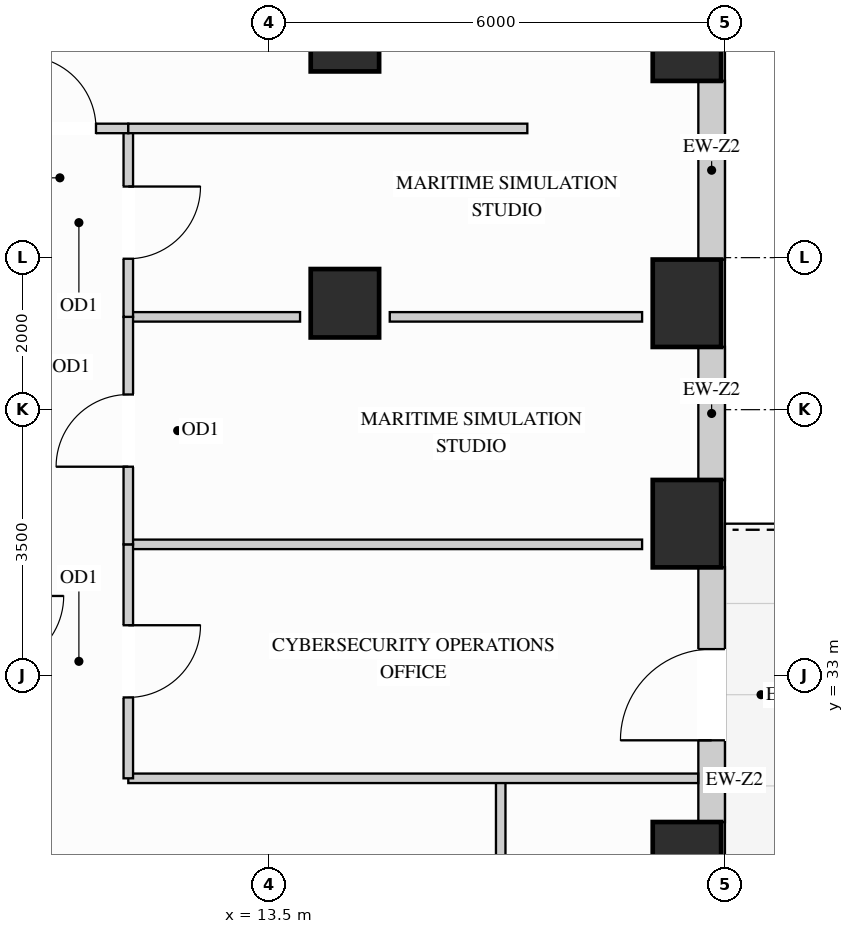
"""IFC4 building model, lengths in metres.
Left out: names, types, materials, properties, quantities, classifications, styles, units other than length and angle.
Written with IfcOpenShell. Run it as: python <this file> out.ifc"""

import sys

from ifc_helpers import new_model, si_unit, direction, frame, frame_2d, origin, origin_2d, place, context, subcontext, project, spatial, rectangle, extrude, source, transform, mapped, element, fill, save


model = new_model("IFC4")
c1 = context("Model", 3, precision=1e-05, world=origin(), true_north=direction((0.0, 1.0)))
c2 = subcontext(c1, "Body", "Model", "MODEL_VIEW")
j1 = project(units=[si_unit("LENGTHUNIT", "METRE"), si_unit("PLANEANGLEUNIT", "RADIAN")], contexts=[c1])
p1 = place(None, origin())
s1 = spatial("IfcSite", under=j1, at=p1, CompositionType="ELEMENT")
p2 = place(p1, origin())
s2 = spatial("IfcBuilding", under=s1, at=p2, CompositionType="ELEMENT")
p3 = place(p2, frame((0.0, 0.0, 127.8)))
s3 = spatial("IfcBuildingStorey", under=s2, at=p3, CompositionType="ELEMENT", Elevation=127.8)
m1 = source(origin(), c2, "Body", "SweptSolid", [
    extrude(rectangle(XDim=0.9, YDim=0.9, at=origin_2d()), origin(), (0.0, 0.0, 1.0), 3.38),
])
for number, where, z_axis, x_axis in (
    (1, (14.5, 37.9, 0.0), (0.0, 0.0, 1.0), (1.0, 0.0, 0.0)),
    (2, (14.5, 41.4, 0.0), (0.0, 0.0, 1.0), (1.0, 0.0, 0.0)),
):
    element("IfcColumn", number, at=place(p3, frame(where, z_axis=z_axis, x_axis=x_axis)), inside=s3, PredefinedType="COLUMN", context=c2, shape_type="MappedRepresentation", body=[
        mapped(m1, transform((0.0, 0.0, 0.0), x_axis=(1.0, 0.0, 0.0), y_axis=(0.0, 1.0, 0.0), z_axis=(0.0, 0.0, 1.0))),
    ])
m2 = source(origin(), c2, "Body", "SweptSolid", [
    extrude(rectangle(XDim=0.9, YDim=1.15, at=origin_2d()), origin(), (0.0, 0.0, 1.0), 3.38),
])
for number, where, z_axis, x_axis in (
    (3, (19.0, 30.5, 0.0), (0.0, 0.0, 1.0), (1.0, 0.0, 0.0)),
    (4, (19.0, 35.0, 0.0), (0.0, 0.0, 1.0), (1.0, 0.0, 0.0)),
    (5, (19.0, 37.9, 0.0), (0.0, 0.0, 1.0), (1.0, 0.0, 0.0)),
    (6, (19.0, 41.4, 0.0), (0.0, 0.0, 1.0), (1.0, 0.0, 0.0)),
):
    element("IfcColumn", number, at=place(p3, frame(where, z_axis=z_axis, x_axis=x_axis)), inside=s3, PredefinedType="COLUMN", context=c2, shape_type="MappedRepresentation", body=[
        mapped(m2, transform((0.0, 0.0, 0.0), x_axis=(1.0, 0.0, 0.0), y_axis=(0.0, 1.0, 0.0), z_axis=(0.0, 0.0, 1.0))),
    ])
p4 = place(p3, frame((19.325, 31.073, 0.0), z_axis=(0.0, 0.0, 1.0), x_axis=(0.0, 1.0, 0.0)))
e7 = element("IfcWall", 7, at=p4, inside=s3, PredefinedType="SOLIDWALL", context=c2, shape_type="SweptSolid", body=[
    extrude(rectangle(XDim=3.354, YDim=0.35, at=frame_2d((1.677, 0.0))), origin(), (0.0, 0.0, 1.0), 2.519),
])
p5 = place(p4, frame((1.077, 0.0, 0.0)))
e8 = element("IfcOpeningElement", 8, at=p5, cuts=e7, PredefinedType="OPENING", context=c2, shape_type="SweptSolid", body=[
    extrude(rectangle(XDim=1.2, YDim=2.15, at=frame_2d((0.6, 1.075))), frame((0.0, 0.185, 0.0), z_axis=(0.0, -1.0, 0.0), x_axis=(1.0, 0.0, 0.0)), (0.0, 0.0, 1.0), 0.37),
])
m3 = source(origin(), c2, "Body", "SweptSolid", [
    extrude(rectangle(XDim=1.754, YDim=0.35, at=frame_2d((0.877, 0.0))), origin(), (0.0, 0.0, 1.0), 2.519),
])
p6 = place(p3, frame((19.325, 35.573, 0.0), z_axis=(0.0, 0.0, 1.0), x_axis=(0.0, 1.0, 0.0)))
e9 = element("IfcWall", 9, at=p6, inside=s3, PredefinedType="SOLIDWALL", context=c2, shape_type="MappedRepresentation", body=[
    mapped(m3, transform((0.0, 0.0, 0.0), x_axis=(1.0, 0.0, 0.0), y_axis=(0.0, 1.0, 0.0), z_axis=(0.0, 0.0, 1.0))),
])
m4 = source(origin(), c2, "Body", "SweptSolid", [
    extrude(rectangle(XDim=2.354, YDim=0.35, at=frame_2d((1.177, 0.0))), origin(), (0.0, 0.0, 1.0), 2.519),
])
p7 = place(p3, frame((19.325, 38.473, 0.0), z_axis=(0.0, 0.0, 1.0), x_axis=(0.0, 1.0, 0.0)))
e10 = element("IfcWall", 10, at=p7, inside=s3, PredefinedType="SOLIDWALL", context=c2, shape_type="MappedRepresentation", body=[
    mapped(m4, transform((0.0, 0.0, 0.0), x_axis=(1.0, 0.0, 0.0), y_axis=(0.0, 1.0, 0.0), z_axis=(0.0, 0.0, 1.0))),
])
p8 = place(p3, frame((16.55, 26.05, 0.0), z_axis=(0.0, 0.0, 1.0), x_axis=(0.0, 1.0, 0.0)))
e11 = element("IfcWall", 11, at=p8, inside=s3, PredefinedType="PARTITIONING", context=c2, shape_type="SweptSolid", body=[
    extrude(rectangle(XDim=5.6, YDim=0.125, at=frame_2d((2.8, 0.0))), origin(), (0.0, 0.0, 1.0), 3.365),
])
p9 = place(p8, frame((2.325, 0.0, 0.0)))
e12 = element("IfcOpeningElement", 12, at=p9, cuts=e11, PredefinedType="OPENING", context=c2, shape_type="SweptSolid", body=[
    extrude(rectangle(XDim=0.95, YDim=2.15, at=frame_2d((0.475, 1.075))), frame((0.0, 0.073, 0.0), z_axis=(0.0, -1.0, 0.0), x_axis=(1.0, 0.0, 0.0)), (0.0, 0.0, 1.0), 0.145),
])
m5 = source(origin(), c2, "Body", "SweptSolid", [
    extrude(rectangle(XDim=6.76, YDim=0.125, at=frame_2d((3.38, 0.0))), origin(), (0.0, 0.0, 1.0), 3.365),
])
p10 = place(p3, frame((11.65, 34.728, 0.0), z_axis=(0.0, 0.0, 1.0), x_axis=(1.0, 0.0, 0.0)))
e13 = element("IfcWall", 13, at=p10, inside=s3, PredefinedType="PARTITIONING", context=c2, shape_type="MappedRepresentation", body=[
    mapped(m5, transform((0.0, 0.0, 0.0), x_axis=(1.0, 0.0, 0.0), y_axis=(0.0, 1.0, 0.0), z_axis=(0.0, 0.0, 1.0))),
])
m6 = source(origin(), c2, "Body", "SweptSolid", [
    extrude(rectangle(XDim=2.26, YDim=0.125, at=frame_2d((1.13, 0.0))), origin(), (0.0, 0.0, 1.0), 2.677),
])
p11 = place(p3, frame((11.65, 37.721, 0.0), z_axis=(0.0, 0.0, 1.0), x_axis=(1.0, 0.0, 0.0)))
e14 = element("IfcWall", 14, at=p11, inside=s3, PredefinedType="PARTITIONING", context=c2, shape_type="MappedRepresentation", body=[
    mapped(m6, transform((0.0, 0.0, 0.0), x_axis=(1.0, 0.0, 0.0), y_axis=(0.0, 1.0, 0.0), z_axis=(0.0, 0.0, 1.0))),
])
m7 = source(origin(), c2, "Body", "SweptSolid", [
    extrude(rectangle(XDim=3.32, YDim=0.125, at=frame_2d((1.66, 0.0))), origin(), (0.0, 0.0, 1.0), 2.677),
])
p12 = place(p3, frame((15.09, 37.721, 0.0), z_axis=(0.0, 0.0, 1.0), x_axis=(1.0, 0.0, 0.0)))
e15 = element("IfcWall", 15, at=p12, inside=s3, PredefinedType="PARTITIONING", context=c2, shape_type="MappedRepresentation", body=[
    mapped(m7, transform((0.0, 0.0, 0.0), x_axis=(1.0, 0.0, 0.0), y_axis=(0.0, 1.0, 0.0), z_axis=(0.0, 0.0, 1.0))),
])
m8 = source(origin(), c2, "Body", "SweptSolid", [
    extrude(rectangle(XDim=7.498, YDim=0.125, at=frame_2d((3.749, 0.0))), origin(), (0.0, 0.0, 1.0), 2.828),
])
p13 = place(p3, frame((11.65, 31.65, 0.0), z_axis=(0.0, 0.0, 1.0), x_axis=(1.0, 0.0, 0.0)))
e16 = element("IfcWall", 16, at=p13, inside=s3, PredefinedType="PARTITIONING", context=c2, shape_type="MappedRepresentation", body=[
    mapped(m8, transform((0.0, 0.0, 0.0), x_axis=(1.0, 0.0, 0.0), y_axis=(0.0, 1.0, 0.0), z_axis=(0.0, 0.0, 1.0))),
])
p14 = place(p3, frame((11.65, 31.65, 0.0), z_axis=(0.0, 0.0, 1.0), x_axis=(0.0, 1.0, 0.0)))
e17 = element("IfcWall", 17, at=p14, inside=s3, PredefinedType="PARTITIONING", context=c2, shape_type="SweptSolid", body=[
    extrude(rectangle(XDim=3.078, YDim=0.125, at=frame_2d((1.539, 0.0))), origin(), (0.0, 0.0, 1.0), 3.365),
])
p15 = place(p14, frame((1.064, 0.0, 0.0)))
e18 = element("IfcOpeningElement", 18, at=p15, cuts=e17, PredefinedType="OPENING", context=c2, shape_type="SweptSolid", body=[
    extrude(rectangle(XDim=0.95, YDim=2.15, at=frame_2d((0.475, 1.075))), frame((0.0, 0.073, 0.0), z_axis=(0.0, -1.0, 0.0), x_axis=(1.0, 0.0, 0.0)), (0.0, 0.0, 1.0), 0.145),
])
p16 = place(p3, frame((11.65, 34.728, 0.0), z_axis=(0.0, 0.0, 1.0), x_axis=(0.0, 1.0, 0.0)))
e19 = element("IfcWall", 19, at=p16, inside=s3, PredefinedType="PARTITIONING", context=c2, shape_type="SweptSolid", body=[
    extrude(rectangle(XDim=2.993, YDim=0.125, at=frame_2d((1.497, 0.0))), origin(), (0.0, 0.0, 1.0), 3.365),
])
p17 = place(p16, frame((1.021, 0.0, 0.0)))
e20 = element("IfcOpeningElement", 20, at=p17, cuts=e19, PredefinedType="OPENING", context=c2, shape_type="SweptSolid", body=[
    extrude(rectangle(XDim=0.95, YDim=2.15, at=frame_2d((0.475, 1.075))), frame((0.0, 0.073, 0.0), z_axis=(0.0, -1.0, 0.0), x_axis=(1.0, 0.0, 0.0)), (0.0, 0.0, 1.0), 0.145),
])
p18 = place(p3, frame((11.65, 37.721, 0.0), z_axis=(0.0, 0.0, 1.0), x_axis=(0.0, 1.0, 0.0)))
e21 = element("IfcWall", 21, at=p18, inside=s3, PredefinedType="PARTITIONING", context=c2, shape_type="SweptSolid", body=[
    extrude(rectangle(XDim=2.479, YDim=0.125, at=frame_2d((1.24, 0.0))), origin(), (0.0, 0.0, 1.0), 3.365),
])
p19 = place(p18, frame((0.764, 0.0, 0.0)))
e22 = element("IfcOpeningElement", 22, at=p19, cuts=e21, PredefinedType="OPENING", context=c2, shape_type="SweptSolid", body=[
    extrude(rectangle(XDim=0.95, YDim=2.15, at=frame_2d((0.475, 1.075))), frame((0.0, 0.073, 0.0), z_axis=(0.0, -1.0, 0.0), x_axis=(1.0, 0.0, 0.0)), (0.0, 0.0, 1.0), 0.145),
])
p20 = place(p3, frame((9.85, 40.2, 0.0), z_axis=(0.0, 0.0, 1.0), x_axis=(1.0, 0.0, 0.0)))
e23 = element("IfcWall", 23, at=p20, inside=s3, PredefinedType="PARTITIONING", context=c2, shape_type="SweptSolid", body=[
    extrude(rectangle(XDim=1.8, YDim=0.125, at=frame_2d((0.9, 0.0))), origin(), (0.0, 0.0, 1.0), 3.365),
])
p21 = place(p20, frame((0.425, 0.0, 0.0)))
e24 = element("IfcOpeningElement", 24, at=p21, cuts=e23, PredefinedType="OPENING", context=c2, shape_type="SweptSolid", body=[
    extrude(rectangle(XDim=0.95, YDim=2.15, at=frame_2d((0.475, 1.075))), frame((0.0, 0.073, 0.0), z_axis=(0.0, -1.0, 0.0), x_axis=(1.0, 0.0, 0.0)), (0.0, 0.0, 1.0), 0.145),
])
m9 = source(origin(), c2, "Body", "SweptSolid", [
    extrude(rectangle(XDim=5.25, YDim=0.125, at=frame_2d((2.625, 0.0))), origin(), (0.0, 0.0, 1.0), 3.365),
])
p22 = place(p3, frame((11.65, 40.2, 0.0), z_axis=(0.0, 0.0, 1.0), x_axis=(1.0, 0.0, 0.0)))
e25 = element("IfcWall", 25, at=p22, inside=s3, PredefinedType="PARTITIONING", context=c2, shape_type="MappedRepresentation", body=[
    mapped(m9, transform((0.0, 0.0, 0.0), x_axis=(1.0, 0.0, 0.0), y_axis=(0.0, 1.0, 0.0), z_axis=(0.0, 0.0, 1.0))),
])
m10 = source(origin(), c2, "Body", "SweptSolid", [
    extrude(rectangle(XDim=1.2, YDim=2.15, at=frame_2d((0.6, 1.075))), frame((0.0, 0.025, 0.0), z_axis=(0.0, -1.0, 0.0), x_axis=(1.0, 0.0, 0.0)), (0.0, 0.0, 1.0), 0.05),
])
p23 = place(p5, frame((1.2, 0.0, 0.0), z_axis=(0.0, 0.0, 1.0), x_axis=(-1.0, 0.0, 0.0)))
e26 = element("IfcDoor", 26, at=p23, inside=s3, OperationType="SINGLE_SWING_LEFT", PredefinedType="DOOR", context=c2, shape_type="MappedRepresentation", body=[
    mapped(m10, transform((0.0, 0.0, 0.0), x_axis=(1.0, 0.0, 0.0), y_axis=(0.0, 1.0, 0.0), z_axis=(0.0, 0.0, 1.0))),
])
fill(e8, e26)
m11 = source(origin(), c2, "Body", "SweptSolid", [
    extrude(rectangle(XDim=0.95, YDim=2.15, at=frame_2d((0.475, 1.075))), frame((0.0, 0.025, 0.0), z_axis=(0.0, -1.0, 0.0), x_axis=(1.0, 0.0, 0.0)), (0.0, 0.0, 1.0), 0.05),
])
p24 = place(p15, origin())
e27 = element("IfcDoor", 27, at=p24, inside=s3, OperationType="SINGLE_SWING_RIGHT", PredefinedType="DOOR", context=c2, shape_type="MappedRepresentation", body=[
    mapped(m11, transform((0.0, 0.0, 0.0), x_axis=(1.0, 0.0, 0.0), y_axis=(0.0, 1.0, 0.0), z_axis=(0.0, 0.0, 1.0))),
])
fill(e18, e27)
p25 = place(p17, origin())
e28 = element("IfcDoor", 28, at=p25, inside=s3, OperationType="SINGLE_SWING_LEFT", PredefinedType="DOOR", context=c2, shape_type="MappedRepresentation", body=[
    mapped(m11, transform((0.0, 0.0, 0.0), x_axis=(1.0, 0.0, 0.0), y_axis=(0.0, 1.0, 0.0), z_axis=(0.0, 0.0, 1.0))),
])
fill(e20, e28)
p26 = place(p19, origin())
e29 = element("IfcDoor", 29, at=p26, inside=s3, OperationType="SINGLE_SWING_RIGHT", PredefinedType="DOOR", context=c2, shape_type="MappedRepresentation", body=[
    mapped(m11, transform((0.0, 0.0, 0.0), x_axis=(1.0, 0.0, 0.0), y_axis=(0.0, 1.0, 0.0), z_axis=(0.0, 0.0, 1.0))),
])
fill(e22, e29)
p27 = place(p21, origin())
e30 = element("IfcDoor", 30, at=p27, inside=s3, OperationType="SINGLE_SWING_LEFT", PredefinedType="DOOR", context=c2, shape_type="MappedRepresentation", body=[
    mapped(m11, transform((0.0, 0.0, 0.0), x_axis=(1.0, 0.0, 0.0), y_axis=(0.0, 1.0, 0.0), z_axis=(0.0, 0.0, 1.0))),
])
fill(e24, e30)
save(model, sys.argv[1])
